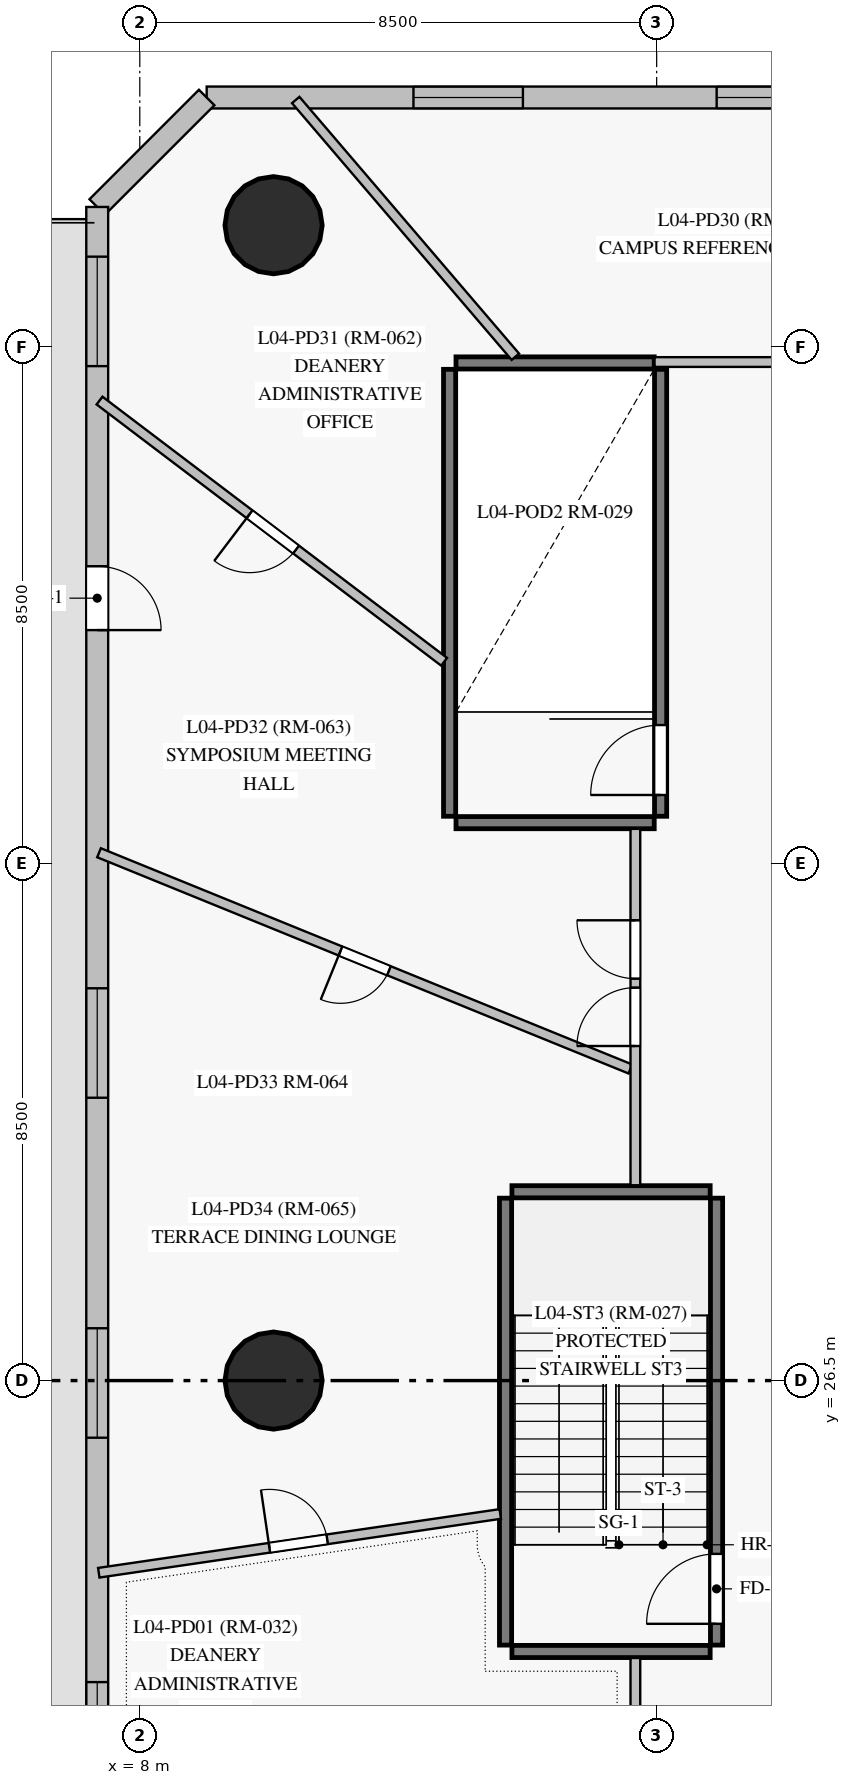
"""IFC4 building model, lengths in metres.
Left out: names, types, materials, properties, quantities, classifications, styles, units other than length and angle.
Written with IfcOpenShell. Run it as: python <this file> out.ifc"""

import sys

from ifc_helpers import new_model, si_unit, direction, frame, frame_2d, origin, origin_with_axes, origin_2d, place, context, subcontext, project, spatial, rectangle, circle, extrude, source, transform, mapped, element, fill, save


model = new_model("IFC4")
c1 = context("Model", 3, precision=1e-05, world=origin(), true_north=direction((0.0, 1.0)))
c2 = subcontext(c1, "Body", "Model", "MODEL_VIEW")
j1 = project(units=[si_unit("LENGTHUNIT", "METRE"), si_unit("PLANEANGLEUNIT", "RADIAN")], contexts=[c1])
p1 = place(None, origin())
s1 = spatial("IfcSite", under=j1, at=p1, CompositionType="ELEMENT")
p2 = place(p1, origin())
s2 = spatial("IfcBuilding", under=s1, at=p2, CompositionType="ELEMENT")
p3 = place(p2, frame((0.0, 0.0, 18.0)))
s3 = spatial("IfcBuildingStorey", under=s2, at=p3, CompositionType="ELEMENT", Elevation=18.0)
m1 = source(origin_with_axes(), c2, "Body", "SweptSolid", [
    extrude(circle(Radius=0.8, at=origin_2d()), origin(), (0.0, 0.0, 1.0), 4.5),
])
for number, where, z_axis, x_axis in (
    (1, (10.2, 26.5, 0.0), (0.0, 0.0, 1.0), (1.0, 0.0, 0.0)),
    (2, (10.2, 45.5, 0.0), (0.0, 0.0, 1.0), (1.0, 0.0, 0.0)),
):
    element("IfcColumn", number, at=place(p3, frame(where, z_axis=z_axis, x_axis=x_axis)), inside=s3, PredefinedType="COLUMN", context=c2, shape_type="MappedRepresentation", body=[
        mapped(m1, transform((0.0, 0.0, 0.0), scale=1.0)),
    ])
p4 = place(p3, frame((53.4, 47.6, 0.0), z_axis=(0.0, 0.0, 1.0), x_axis=(-1.0, 0.0, 0.0)))
e3 = element("IfcWall", 3, at=p4, inside=s3, PredefinedType="SOLIDWALL", context=c2, shape_type="SweptSolid", body=[
    extrude(rectangle(XDim=44.3, YDim=0.36, at=frame_2d((22.15, 0.0))), origin(), (0.0, 0.0, 1.0), 4.225),
])
p5 = place(p4, frame((1.763, 0.0, 0.85)))
e4 = element("IfcOpeningElement", 4, at=p5, cuts=e3, PredefinedType="OPENING", context=c2, shape_type="SweptSolid", body=[
    extrude(rectangle(XDim=1.8, YDim=2.2, at=frame_2d((0.9, 1.1))), frame((0.0, 0.19, 0.0), z_axis=(0.0, -1.0, 0.0), x_axis=(1.0, 0.0, 0.0)), (0.0, 0.0, 1.0), 0.38),
])
p6 = place(p4, frame((6.906, 0.0, 0.85)))
e5 = element("IfcOpeningElement", 5, at=p6, cuts=e3, PredefinedType="OPENING", context=c2, shape_type="SweptSolid", body=[
    extrude(rectangle(XDim=1.8, YDim=2.2, at=frame_2d((0.9, 1.1))), frame((0.0, 0.19, 0.0), z_axis=(0.0, -1.0, 0.0), x_axis=(1.0, 0.0, 0.0)), (0.0, 0.0, 1.0), 0.38),
])
p7 = place(p4, frame((11.903, 0.0, 0.85)))
e6 = element("IfcOpeningElement", 6, at=p7, cuts=e3, PredefinedType="OPENING", context=c2, shape_type="SweptSolid", body=[
    extrude(rectangle(XDim=1.8, YDim=2.2, at=frame_2d((0.9, 1.1))), frame((0.0, 0.19, 0.0), z_axis=(0.0, -1.0, 0.0), x_axis=(1.0, 0.0, 0.0)), (0.0, 0.0, 1.0), 0.38),
])
p8 = place(p4, frame((16.2, 0.0, 0.85)))
e7 = element("IfcOpeningElement", 7, at=p8, cuts=e3, PredefinedType="OPENING", context=c2, shape_type="SweptSolid", body=[
    extrude(rectangle(XDim=1.8, YDim=2.2, at=frame_2d((0.9, 1.1))), frame((0.0, 0.19, 0.0), z_axis=(0.0, -1.0, 0.0), x_axis=(1.0, 0.0, 0.0)), (0.0, 0.0, 1.0), 0.38),
])
p9 = place(p4, frame((23.82, 0.0, 0.85)))
e8 = element("IfcOpeningElement", 8, at=p9, cuts=e3, PredefinedType="OPENING", context=c2, shape_type="SweptSolid", body=[
    extrude(rectangle(XDim=1.8, YDim=2.2, at=frame_2d((0.9, 1.1))), frame((0.0, 0.19, 0.0), z_axis=(0.0, -1.0, 0.0), x_axis=(1.0, 0.0, 0.0)), (0.0, 0.0, 1.0), 0.38),
])
p10 = place(p4, frame((29.2, 0.0, 0.85)))
e9 = element("IfcOpeningElement", 9, at=p10, cuts=e3, PredefinedType="OPENING", context=c2, shape_type="SweptSolid", body=[
    extrude(rectangle(XDim=1.8, YDim=2.2, at=frame_2d((0.9, 1.1))), frame((0.0, 0.19, 0.0), z_axis=(0.0, -1.0, 0.0), x_axis=(1.0, 0.0, 0.0)), (0.0, 0.0, 1.0), 0.38),
])
p11 = place(p4, frame((34.113, 0.0, 0.85)))
e10 = element("IfcOpeningElement", 10, at=p11, cuts=e3, PredefinedType="OPENING", context=c2, shape_type="SweptSolid", body=[
    extrude(rectangle(XDim=1.8, YDim=2.2, at=frame_2d((0.9, 1.1))), frame((0.0, 0.19, 0.0), z_axis=(0.0, -1.0, 0.0), x_axis=(1.0, 0.0, 0.0)), (0.0, 0.0, 1.0), 0.38),
])
p12 = place(p4, frame((39.1, 0.0, 0.85)))
e11 = element("IfcOpeningElement", 11, at=p12, cuts=e3, PredefinedType="OPENING", context=c2, shape_type="SweptSolid", body=[
    extrude(rectangle(XDim=1.8, YDim=2.2, at=frame_2d((0.9, 1.1))), frame((0.0, 0.19, 0.0), z_axis=(0.0, -1.0, 0.0), x_axis=(1.0, 0.0, 0.0)), (0.0, 0.0, 1.0), 0.38),
])
p13 = place(p3, frame((9.1, 47.6, 0.0), z_axis=(0.0, 0.0, 1.0), x_axis=(-0.707106781187, -0.707106781187, 0.0)))
e12 = element("IfcWall", 12, at=p13, inside=s3, PredefinedType="SOLIDWALL", context=c2, shape_type="SweptSolid", body=[
    extrude(rectangle(XDim=2.546, YDim=0.36, at=frame_2d((1.273, 0.0))), origin(), (0.0, 0.0, 1.0), 4.225),
])
p14 = place(p3, frame((7.3, 45.8, 0.0), z_axis=(0.0, 0.0, 1.0), x_axis=(0.0, -1.0, 0.0)))
e13 = element("IfcWall", 13, at=p14, inside=s3, PredefinedType="SOLIDWALL", context=c2, shape_type="SweptSolid", body=[
    extrude(rectangle(XDim=38.6, YDim=0.36, at=frame_2d((19.3, 0.0))), origin(), (0.0, 0.0, 1.0), 4.225),
])
p15 = place(p14, frame((0.817, 0.0, 0.85)))
e14 = element("IfcOpeningElement", 14, at=p15, cuts=e13, PredefinedType="OPENING", context=c2, shape_type="SweptSolid", body=[
    extrude(rectangle(XDim=1.8, YDim=2.2, at=frame_2d((0.9, 1.1))), frame((0.0, 0.19, 0.0), z_axis=(0.0, -1.0, 0.0), x_axis=(1.0, 0.0, 0.0)), (0.0, 0.0, 1.0), 0.38),
])
p16 = place(p14, frame((12.849, 0.0, 0.85)))
e15 = element("IfcOpeningElement", 15, at=p16, cuts=e13, PredefinedType="OPENING", context=c2, shape_type="SweptSolid", body=[
    extrude(rectangle(XDim=1.8, YDim=2.2, at=frame_2d((0.9, 1.1))), frame((0.0, 0.19, 0.0), z_axis=(0.0, -1.0, 0.0), x_axis=(1.0, 0.0, 0.0)), (0.0, 0.0, 1.0), 0.38),
])
p17 = place(p14, frame((18.439, 0.0, 0.85)))
e16 = element("IfcOpeningElement", 16, at=p17, cuts=e13, PredefinedType="OPENING", context=c2, shape_type="SweptSolid", body=[
    extrude(rectangle(XDim=1.8, YDim=2.2, at=frame_2d((0.9, 1.1))), frame((0.0, 0.19, 0.0), z_axis=(0.0, -1.0, 0.0), x_axis=(1.0, 0.0, 0.0)), (0.0, 0.0, 1.0), 0.38),
])
p18 = place(p14, frame((24.258, 0.0, 0.85)))
e17 = element("IfcOpeningElement", 17, at=p18, cuts=e13, PredefinedType="OPENING", context=c2, shape_type="SweptSolid", body=[
    extrude(rectangle(XDim=1.8, YDim=2.2, at=frame_2d((0.9, 1.1))), frame((0.0, 0.19, 0.0), z_axis=(0.0, -1.0, 0.0), x_axis=(1.0, 0.0, 0.0)), (0.0, 0.0, 1.0), 0.38),
])
p19 = place(p14, frame((29.025, 0.0, 0.85)))
e18 = element("IfcOpeningElement", 18, at=p19, cuts=e13, PredefinedType="OPENING", context=c2, shape_type="SweptSolid", body=[
    extrude(rectangle(XDim=1.8, YDim=2.2, at=frame_2d((0.9, 1.1))), frame((0.0, 0.19, 0.0), z_axis=(0.0, -1.0, 0.0), x_axis=(1.0, 0.0, 0.0)), (0.0, 0.0, 1.0), 0.38),
])
p20 = place(p14, frame((34.599, 0.0, 0.85)))
e19 = element("IfcOpeningElement", 19, at=p20, cuts=e13, PredefinedType="OPENING", context=c2, shape_type="SweptSolid", body=[
    extrude(rectangle(XDim=1.8, YDim=2.2, at=frame_2d((0.9, 1.1))), frame((0.0, 0.19, 0.0), z_axis=(0.0, -1.0, 0.0), x_axis=(1.0, 0.0, 0.0)), (0.0, 0.0, 1.0), 0.38),
])
p21 = place(p14, frame((5.908, 0.0, 0.0)))
e20 = element("IfcOpeningElement", 20, at=p21, cuts=e13, PredefinedType="OPENING", context=c2, shape_type="SweptSolid", body=[
    extrude(rectangle(XDim=1.05, YDim=2.12, at=frame_2d((0.525, 1.06))), frame((0.0, 0.19, 0.0), z_axis=(0.0, -1.0, 0.0), x_axis=(1.0, 0.0, 0.0)), (0.0, 0.0, 1.0), 0.38),
])
p22 = place(p3, frame((14.015, 22.15, 0.0), z_axis=(0.0, 0.0, 1.0), x_axis=(0.0, 1.0, 0.0)))
e21 = element("IfcWall", 21, at=p22, inside=s3, PredefinedType="SHEAR", context=c2, shape_type="SweptSolid", body=[
    extrude(rectangle(XDim=7.35, YDim=0.2, at=frame_2d((3.675, 0.0))), origin(), (0.0, 0.0, 1.0), 4.225),
])
p23 = place(p3, frame((17.485, 22.15, 0.0), z_axis=(0.0, 0.0, 1.0), x_axis=(0.0, 1.0, 0.0)))
e22 = element("IfcWall", 22, at=p23, inside=s3, PredefinedType="SHEAR", context=c2, shape_type="SweptSolid", body=[
    extrude(rectangle(XDim=7.35, YDim=0.2, at=frame_2d((3.675, 0.0))), origin(), (0.0, 0.0, 1.0), 4.225),
])
p24 = place(p23, frame((0.35, 0.0, 0.0)))
e23 = element("IfcOpeningElement", 23, at=p24, cuts=e22, PredefinedType="OPENING", context=c2, shape_type="SweptSolid", body=[
    extrude(rectangle(XDim=1.15, YDim=2.15, at=frame_2d((0.575, 1.075))), frame((0.0, 0.11, 0.0), z_axis=(0.0, -1.0, 0.0), x_axis=(1.0, 0.0, 0.0)), (0.0, 0.0, 1.0), 0.22),
])
p25 = place(p3, frame((13.095, 35.78, 0.0), z_axis=(0.0, 0.0, 1.0), x_axis=(0.0, 1.0, 0.0)))
e24 = element("IfcWall", 24, at=p25, inside=s3, PredefinedType="SHEAR", context=c2, shape_type="SweptSolid", body=[
    extrude(rectangle(XDim=7.35, YDim=0.2, at=frame_2d((3.675, 0.0))), origin(), (0.0, 0.0, 1.0), 4.225),
])
p26 = place(p3, frame((16.565, 35.78, 0.0), z_axis=(0.0, 0.0, 1.0), x_axis=(0.0, 1.0, 0.0)))
e25 = element("IfcWall", 25, at=p26, inside=s3, PredefinedType="SHEAR", context=c2, shape_type="SweptSolid", body=[
    extrude(rectangle(XDim=7.35, YDim=0.2, at=frame_2d((3.675, 0.0))), origin(), (0.0, 0.0, 1.0), 4.225),
])
p27 = place(p26, frame((0.35, 0.0, 0.0)))
e26 = element("IfcOpeningElement", 26, at=p27, cuts=e25, PredefinedType="OPENING", context=c2, shape_type="SweptSolid", body=[
    extrude(rectangle(XDim=1.15, YDim=2.15, at=frame_2d((0.575, 1.075))), frame((0.0, 0.11, 0.0), z_axis=(0.0, -1.0, 0.0), x_axis=(1.0, 0.0, 0.0)), (0.0, 0.0, 1.0), 0.22),
])
for number, where, z_axis, x_axis in (
    (27, (13.2, 35.675, 0.0), (0.0, 0.0, 1.0), (1.0, 0.0, 0.0)),
    (28, (13.2, 43.235, 0.0), (0.0, 0.0, 1.0), (1.0, 0.0, 0.0)),
):
    element("IfcWall", number, at=place(p3, frame(where, z_axis=z_axis, x_axis=x_axis)), inside=s3, PredefinedType="SHEAR", context=c2, shape_type="SweptSolid", body=[
        extrude(rectangle(XDim=3.26, YDim=0.2, at=frame_2d((1.63, 0.0))), origin(), (0.0, 0.0, 1.0), 4.225),
    ])
for number, where, z_axis, x_axis in (
    (29, (14.12, 22.045, 0.0), (0.0, 0.0, 1.0), (1.0, 0.0, 0.0)),
    (30, (14.12, 29.605, 0.0), (0.0, 0.0, 1.0), (1.0, 0.0, 0.0)),
):
    element("IfcWall", number, at=place(p3, frame(where, z_axis=z_axis, x_axis=x_axis)), inside=s3, PredefinedType="SHEAR", context=c2, shape_type="SweptSolid", body=[
        extrude(rectangle(XDim=3.26, YDim=0.2, at=frame_2d((1.63, 0.0))), origin(), (0.0, 0.0, 1.0), 4.225),
    ])
p28 = place(p3, frame((16.068, 31.624, 0.0), z_axis=(0.0, 0.0, 1.0), x_axis=(-0.92624533241, 0.376921190952, 0.0)))
e31 = element("IfcWall", 31, at=p28, inside=s3, PredefinedType="PARTITIONING", context=c2, shape_type="SweptSolid", body=[
    extrude(rectangle(XDim=9.434, YDim=0.16, at=frame_2d((4.717, 0.0))), origin(), (0.0, 0.0, 1.0), 4.225),
])
p29 = place(p28, frame((4.287, 0.0, 0.0)))
e32 = element("IfcOpeningElement", 32, at=p29, cuts=e31, PredefinedType="OPENING", context=c2, shape_type="SweptSolid", body=[
    extrude(rectangle(XDim=0.86, YDim=2.04, at=frame_2d((0.43, 1.02))), frame((0.0, 0.09, 0.0), z_axis=(0.0, -1.0, 0.0), x_axis=(1.0, 0.0, 0.0)), (0.0, 0.0, 1.0), 0.18),
])
p30 = place(p3, frame((13.005, 38.321, 0.0), z_axis=(0.0, 0.0, 1.0), x_axis=(-0.796928360901, 0.604073826276, 0.0)))
e33 = element("IfcWall", 33, at=p30, inside=s3, PredefinedType="PARTITIONING", context=c2, shape_type="SweptSolid", body=[
    extrude(rectangle(XDim=7.111, YDim=0.16, at=frame_2d((3.555, 0.0))), origin(), (0.0, 0.0, 1.0), 4.225),
])
p31 = place(p30, frame((3.055, 0.0, 0.0)))
e34 = element("IfcOpeningElement", 34, at=p31, cuts=e33, PredefinedType="OPENING", context=c2, shape_type="SweptSolid", body=[
    extrude(rectangle(XDim=0.96, YDim=2.15, at=frame_2d((0.48, 1.075))), frame((0.0, 0.09, 0.0), z_axis=(0.0, -1.0, 0.0), x_axis=(1.0, 0.0, 0.0)), (0.0, 0.0, 1.0), 0.18),
])
p32 = place(p3, frame((7.326, 23.34, 0.0), z_axis=(0.0, 0.0, 1.0), x_axis=(0.989453263478, 0.144852474582, 0.0)))
e35 = element("IfcWall", 35, at=p32, inside=s3, PredefinedType="PARTITIONING", context=c2, shape_type="SweptSolid", body=[
    extrude(rectangle(XDim=6.673, YDim=0.16, at=frame_2d((3.336, 0.0))), origin(), (0.0, 0.0, 1.0), 4.225),
])
p33 = place(p32, frame((2.836, 0.0, 0.0)))
e36 = element("IfcOpeningElement", 36, at=p33, cuts=e35, PredefinedType="OPENING", context=c2, shape_type="SweptSolid", body=[
    extrude(rectangle(XDim=0.96, YDim=2.15, at=frame_2d((0.48, 1.075))), frame((0.0, 0.09, 0.0), z_axis=(0.0, -1.0, 0.0), x_axis=(1.0, 0.0, 0.0)), (0.0, 0.0, 1.0), 0.18),
])
p34 = place(p3, frame((16.15, 29.712, 0.0), z_axis=(0.0, 0.0, 1.0), x_axis=(0.0, 1.0, 0.0)))
e37 = element("IfcWall", 37, at=p34, inside=s3, PredefinedType="PARTITIONING", context=c2, shape_type="SweptSolid", body=[
    extrude(rectangle(XDim=5.861, YDim=0.16, at=frame_2d((2.93, 0.0))), origin(), (0.0, 0.0, 1.0), 4.225),
])
p35 = place(p34, frame((2.29, 0.0, 0.0)))
e38 = element("IfcOpeningElement", 38, at=p35, cuts=e37, PredefinedType="OPENING", context=c2, shape_type="SweptSolid", body=[
    extrude(rectangle(XDim=0.96, YDim=2.15, at=frame_2d((0.48, 1.075))), frame((0.0, 0.09, 0.0), z_axis=(0.0, -1.0, 0.0), x_axis=(1.0, 0.0, 0.0)), (0.0, 0.0, 1.0), 0.18),
])
p36 = place(p34, frame((3.397, 0.0, 0.0)))
e39 = element("IfcOpeningElement", 39, at=p36, cuts=e37, PredefinedType="OPENING", context=c2, shape_type="SweptSolid", body=[
    extrude(rectangle(XDim=0.96, YDim=2.15, at=frame_2d((0.48, 1.075))), frame((0.0, 0.09, 0.0), z_axis=(0.0, -1.0, 0.0), x_axis=(1.0, 0.0, 0.0)), (0.0, 0.0, 1.0), 0.18),
])
p37 = place(p3, frame((14.177, 43.337, 0.0), z_axis=(0.0, 0.0, 1.0), x_axis=(-0.65004930136, 0.759892035622, 0.0)))
e40 = element("IfcWall", 40, at=p37, inside=s3, PredefinedType="PARTITIONING", context=c2, shape_type="SweptSolid", body=[
    extrude(rectangle(XDim=5.557, YDim=0.16, at=frame_2d((2.778, 0.0))), origin(), (0.0, 0.0, 1.0), 4.225),
])
p38 = place(p3, frame((16.465, 43.25, 0.0), z_axis=(0.0, 0.0, 1.0), x_axis=(1.0, 0.0, 0.0)))
e41 = element("IfcWall", 41, at=p38, inside=s3, PredefinedType="PARTITIONING", context=c2, shape_type="SweptSolid", body=[
    extrude(rectangle(XDim=3.015, YDim=0.16, at=frame_2d((1.507, 0.0))), origin(), (0.0, 0.0, 1.0), 4.225),
])
p39 = place(p3, frame((16.15, 20.42, 0.0), z_axis=(0.0, 0.0, 1.0), x_axis=(0.0, 1.0, 0.0)))
e42 = element("IfcWall", 42, at=p39, inside=s3, PredefinedType="PARTITIONING", context=c2, shape_type="SweptSolid", body=[
    extrude(rectangle(XDim=1.518, YDim=0.16, at=frame_2d((0.759, 0.0))), origin(), (0.0, 0.0, 1.0), 4.225),
])
m2 = source(origin_with_axes(), c2, "Body", "SweptSolid", [
    extrude(rectangle(XDim=1.8, YDim=2.2, at=frame_2d((0.9, 1.1))), frame((0.0, 0.03, 0.0), z_axis=(0.0, -1.0, 0.0), x_axis=(1.0, 0.0, 0.0)), (0.0, 0.0, 1.0), 0.06),
])
p40 = place(p11, origin())
e43 = element("IfcWindow", 43, at=p40, inside=s3, PartitioningType="SINGLE_PANEL", PredefinedType="WINDOW", context=c2, shape_type="MappedRepresentation", body=[
    mapped(m2, transform((0.0, 0.0, 0.0), scale=1.0)),
])
fill(e10, e43)
p41 = place(p12, origin())
e44 = element("IfcWindow", 44, at=p41, inside=s3, PartitioningType="SINGLE_PANEL", PredefinedType="WINDOW", context=c2, shape_type="MappedRepresentation", body=[
    mapped(m2, transform((0.0, 0.0, 0.0), scale=1.0)),
])
fill(e11, e44)
p42 = place(p15, origin())
e45 = element("IfcWindow", 45, at=p42, inside=s3, PartitioningType="SINGLE_PANEL", PredefinedType="WINDOW", context=c2, shape_type="MappedRepresentation", body=[
    mapped(m2, transform((0.0, 0.0, 0.0), scale=1.0)),
])
fill(e14, e45)
p43 = place(p16, origin())
e46 = element("IfcWindow", 46, at=p43, inside=s3, PartitioningType="SINGLE_PANEL", PredefinedType="WINDOW", context=c2, shape_type="MappedRepresentation", body=[
    mapped(m2, transform((0.0, 0.0, 0.0), scale=1.0)),
])
fill(e15, e46)
p44 = place(p17, origin())
e47 = element("IfcWindow", 47, at=p44, inside=s3, PartitioningType="SINGLE_PANEL", PredefinedType="WINDOW", context=c2, shape_type="MappedRepresentation", body=[
    mapped(m2, transform((0.0, 0.0, 0.0), scale=1.0)),
])
fill(e16, e47)
p45 = place(p18, origin())
e48 = element("IfcWindow", 48, at=p45, inside=s3, PartitioningType="SINGLE_PANEL", PredefinedType="WINDOW", context=c2, shape_type="MappedRepresentation", body=[
    mapped(m2, transform((0.0, 0.0, 0.0), scale=1.0)),
])
fill(e17, e48)
m3 = source(origin_with_axes(), c2, "Body", "SweptSolid", [
    extrude(rectangle(XDim=1.05, YDim=2.12, at=frame_2d((0.525, 1.06))), frame((0.0, 0.025, 0.0), z_axis=(0.0, -1.0, 0.0), x_axis=(1.0, 0.0, 0.0)), (0.0, 0.0, 1.0), 0.05),
])
p46 = place(p21, origin())
e49 = element("IfcDoor", 49, at=p46, inside=s3, OperationType="SINGLE_SWING_RIGHT", PredefinedType="DOOR", context=c2, shape_type="MappedRepresentation", body=[
    mapped(m3, transform((0.0, 0.0, 0.0), scale=1.0)),
])
fill(e20, e49)
m4 = source(origin_with_axes(), c2, "Body", "SweptSolid", [
    extrude(rectangle(XDim=1.15, YDim=2.15, at=frame_2d((0.575, 1.075))), frame((0.0, 0.025, 0.0), z_axis=(0.0, -1.0, 0.0), x_axis=(1.0, 0.0, 0.0)), (0.0, 0.0, 1.0), 0.05),
])
p47 = place(p24, origin())
e50 = element("IfcDoor", 50, at=p47, inside=s3, OperationType="SINGLE_SWING_LEFT", PredefinedType="DOOR", context=c2, shape_type="MappedRepresentation", body=[
    mapped(m4, transform((0.0, 0.0, 0.0), scale=1.0)),
])
fill(e23, e50)
p48 = place(p27, origin())
e51 = element("IfcDoor", 51, at=p48, inside=s3, OperationType="SINGLE_SWING_LEFT", PredefinedType="DOOR", context=c2, shape_type="MappedRepresentation", body=[
    mapped(m4, transform((0.0, 0.0, 0.0), scale=1.0)),
])
fill(e26, e51)
m5 = source(origin_with_axes(), c2, "Body", "SweptSolid", [
    extrude(rectangle(XDim=0.96, YDim=2.15, at=frame_2d((0.48, 1.075))), frame((0.0, 0.025, 0.0), z_axis=(0.0, -1.0, 0.0), x_axis=(1.0, 0.0, 0.0)), (0.0, 0.0, 1.0), 0.05),
])
p49 = place(p31, origin())
e52 = element("IfcDoor", 52, at=p49, inside=s3, OperationType="SINGLE_SWING_RIGHT", PredefinedType="DOOR", context=c2, shape_type="MappedRepresentation", body=[
    mapped(m5, transform((0.0, 0.0, 0.0), scale=1.0)),
])
fill(e34, e52)
p50 = place(p35, origin())
e53 = element("IfcDoor", 53, at=p50, inside=s3, OperationType="SINGLE_SWING_LEFT", PredefinedType="DOOR", context=c2, shape_type="MappedRepresentation", body=[
    mapped(m5, transform((0.0, 0.0, 0.0), scale=1.0)),
])
fill(e38, e53)
p51 = place(p36, origin())
e54 = element("IfcDoor", 54, at=p51, inside=s3, OperationType="SINGLE_SWING_RIGHT", PredefinedType="DOOR", context=c2, shape_type="MappedRepresentation", body=[
    mapped(m5, transform((0.0, 0.0, 0.0), scale=1.0)),
])
fill(e39, e54)
p52 = place(p33, origin())
e55 = element("IfcDoor", 55, at=p52, inside=s3, OperationType="SINGLE_SWING_LEFT", PredefinedType="DOOR", context=c2, shape_type="MappedRepresentation", body=[
    mapped(m5, transform((0.0, 0.0, 0.0), scale=1.0)),
])
fill(e36, e55)
m6 = source(origin_with_axes(), c2, "Body", "SweptSolid", [
    extrude(rectangle(XDim=0.86, YDim=2.04, at=frame_2d((0.43, 1.02))), frame((0.0, 0.025, 0.0), z_axis=(0.0, -1.0, 0.0), x_axis=(1.0, 0.0, 0.0)), (0.0, 0.0, 1.0), 0.05),
])
p53 = place(p29, origin())
e56 = element("IfcDoor", 56, at=p53, inside=s3, OperationType="SINGLE_SWING_RIGHT", PredefinedType="DOOR", context=c2, shape_type="MappedRepresentation", body=[
    mapped(m6, transform((0.0, 0.0, 0.0), scale=1.0)),
])
fill(e32, e56)
save(model, sys.argv[1])
